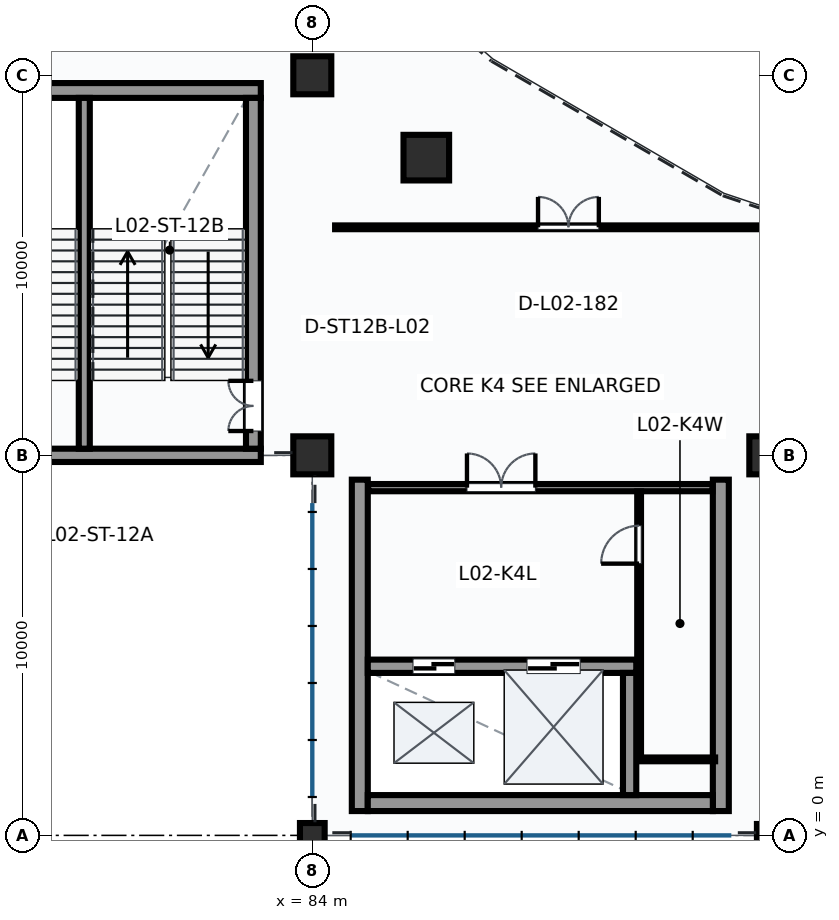
"""IFC4 building model, lengths in metres.
Left out: names, types, materials, properties, quantities, classifications, styles, units other than length and angle.
Written with IfcOpenShell. Run it as: python <this file> out.ifc"""

import sys

from ifc_helpers import new_model, si_unit, direction, frame, frame_2d, origin, origin_2d, place, context, subcontext, project, spatial, rectangle, extrude, element, fill, save


model = new_model("IFC4")
c1 = context("Model", 3, precision=1e-05, world=origin(), true_north=direction((0.0, 1.0)))
c2 = subcontext(c1, "Body", "Model", "MODEL_VIEW")
j1 = project(units=[si_unit("LENGTHUNIT", "METRE"), si_unit("PLANEANGLEUNIT", "RADIAN")], contexts=[c1])
p1 = place(None, origin())
s1 = spatial("IfcSite", under=j1, at=p1, CompositionType="ELEMENT")
p2 = place(p1, origin())
s2 = spatial("IfcBuilding", under=s1, at=p2, CompositionType="ELEMENT")
p3 = place(p2, frame((0.0, 0.0, 10.2)))
s3 = spatial("IfcBuildingStorey", under=s2, at=p3, CompositionType="ELEMENT", Elevation=10.2)
p4 = place(p3, frame((84.0, 0.0, 0.0), z_axis=(0.0, 0.0, 1.0), x_axis=(1.0, 0.0, 0.0)))
e1 = element("IfcColumn", 1, at=p4, inside=s3, PredefinedType="COLUMN", context=c2, shape_type="SweptSolid", body=[
    extrude(rectangle(XDim=0.65, YDim=0.65, at=origin_2d()), origin(), (0.0, 0.0, 1.0), 4.5),
])
for number, where, z_axis, x_axis in (
    (2, (84.0, 10.0, 0.0), (0.0, 0.0, 1.0), (1.0, 0.0, 0.0)),
    (3, (84.0, 20.0, 0.0), (0.0, 0.0, 1.0), (1.0, 0.0, 0.0)),
):
    element("IfcColumn", number, at=place(p3, frame(where, z_axis=z_axis, x_axis=x_axis)), inside=s3, PredefinedType="COLUMN", context=c2, shape_type="SweptSolid", body=[
        extrude(rectangle(XDim=1.0, YDim=1.0, at=origin_2d()), origin(), (0.0, 0.0, 1.0), 4.5),
    ])
p5 = place(p3, frame((96.0, 0.0, 0.0), z_axis=(0.0, 0.0, 1.0), x_axis=(1.0, 0.0, 0.0)))
e4 = element("IfcColumn", 4, at=p5, inside=s3, PredefinedType="COLUMN", context=c2, shape_type="SweptSolid", body=[
    extrude(rectangle(XDim=0.6, YDim=0.6, at=origin_2d()), origin(), (0.0, 0.0, 1.0), 4.5),
])
p6 = place(p3, frame((96.0, 10.0, 0.0), z_axis=(0.0, 0.0, 1.0), x_axis=(1.0, 0.0, 0.0)))
e5 = element("IfcColumn", 5, at=p6, inside=s3, PredefinedType="COLUMN", context=c2, shape_type="SweptSolid", body=[
    extrude(rectangle(XDim=1.0, YDim=1.0, at=origin_2d()), origin(), (0.0, 0.0, 1.0), 4.5),
])
p7 = place(p3, frame((87.0, 17.833, 0.0), z_axis=(0.0, 0.0, 1.0), x_axis=(1.0, 0.0, 0.0)))
e6 = element("IfcColumn", 6, at=p7, inside=s3, PredefinedType="COLUMN", context=c2, shape_type="SweptSolid", body=[
    extrude(rectangle(XDim=1.2, YDim=1.2, at=origin_2d()), origin(), (0.0, 0.0, 1.0), 4.5),
])
p8 = place(p3, frame((73.355, 10.0, 0.0), z_axis=(0.0, 0.0, 1.0), x_axis=(1.0, 0.0, 0.0)))
e7 = element("IfcWall", 7, at=p8, inside=s3, PredefinedType="SHEAR", context=c2, shape_type="SweptSolid", body=[
    extrude(rectangle(XDim=9.29, YDim=0.35, at=frame_2d((4.645, 0.0))), origin(), (0.0, 0.0, 1.0), 3.586),
])
p9 = place(p3, frame((73.355, 19.6, 0.0), z_axis=(0.0, 0.0, 1.0), x_axis=(1.0, 0.0, 0.0)))
e8 = element("IfcWall", 8, at=p9, inside=s3, PredefinedType="SHEAR", context=c2, shape_type="SweptSolid", body=[
    extrude(rectangle(XDim=9.29, YDim=0.39, at=frame_2d((4.645, 0.0))), origin(), (0.0, 0.0, 1.0), 4.5),
])
p10 = place(p3, frame((82.45, 10.175, 0.0), z_axis=(0.0, 0.0, 1.0), x_axis=(0.0, 1.0, 0.0)))
e9 = element("IfcWall", 9, at=p10, inside=s3, PredefinedType="SHEAR", context=c2, shape_type="SweptSolid", body=[
    extrude(rectangle(XDim=9.23, YDim=0.39, at=frame_2d((4.615, 0.0))), origin(), (0.0, 0.0, 1.0), 4.5),
])
p11 = place(p10, frame((0.465, 0.0, 0.0)))
e10 = element("IfcOpeningElement", 10, at=p11, cuts=e9, PredefinedType="OPENING", context=c2, shape_type="SweptSolid", body=[
    extrude(rectangle(XDim=1.32, YDim=2.2, at=frame_2d((0.66, 1.1))), frame((0.0, 0.205, 0.0), z_axis=(0.0, -1.0, 0.0), x_axis=(1.0, 0.0, 0.0)), (0.0, 0.0, 1.0), 0.41),
])
p12 = place(p3, frame((78.0, 10.175, 0.0), z_axis=(0.0, 0.0, 1.0), x_axis=(0.0, 1.0, 0.0)))
e11 = element("IfcWall", 11, at=p12, inside=s3, PredefinedType="SHEAR", context=c2, shape_type="SweptSolid", body=[
    extrude(rectangle(XDim=9.23, YDim=0.29, at=frame_2d((4.615, 0.0))), origin(), (0.0, 0.0, 1.0), 4.5),
])
for number, where, z_axis, x_axis in (
    (12, (85.25, 0.64, 0.0), (0.0, 0.0, 1.0), (0.0, 1.0, 0.0)),
    (13, (94.75, 0.64, 0.0), (0.0, 0.0, 1.0), (0.0, 1.0, 0.0)),
):
    element("IfcWall", number, at=place(p3, frame(where, z_axis=z_axis, x_axis=x_axis)), inside=s3, PredefinedType="SHEAR", context=c2, shape_type="SweptSolid", body=[
        extrude(rectangle(XDim=8.72, YDim=0.42, at=frame_2d((4.36, 0.0))), origin(), (0.0, 0.0, 1.0), 4.5),
    ])
p13 = place(p3, frame((85.46, 0.85, 0.0), z_axis=(0.0, 0.0, 1.0), x_axis=(1.0, 0.0, 0.0)))
e14 = element("IfcWall", 14, at=p13, inside=s3, PredefinedType="SHEAR", context=c2, shape_type="SweptSolid", body=[
    extrude(rectangle(XDim=9.08, YDim=0.42, at=frame_2d((4.54, 0.0))), origin(), (0.0, 0.0, 1.0), 4.5),
])
p14 = place(p3, frame((85.46, 4.45, 0.0), z_axis=(0.0, 0.0, 1.0), x_axis=(1.0, 0.0, 0.0)))
e15 = element("IfcWall", 15, at=p14, inside=s3, PredefinedType="SHEAR", context=c2, shape_type="SweptSolid", body=[
    extrude(rectangle(XDim=7.065, YDim=0.35, at=frame_2d((3.532, 0.0))), origin(), (0.0, 0.0, 1.0), 4.5),
])
p15 = place(p14, frame((1.19, 0.0, 0.0)))
e16 = element("IfcOpeningElement", 16, at=p15, cuts=e15, PredefinedType="OPENING", context=c2, shape_type="SweptSolid", body=[
    extrude(rectangle(XDim=1.1, YDim=2.2, at=frame_2d((0.55, 1.1))), frame((0.0, 0.185, 0.0), z_axis=(0.0, -1.0, 0.0), x_axis=(1.0, 0.0, 0.0)), (0.0, 0.0, 1.0), 0.37),
])
p16 = place(p14, frame((4.19, 0.0, 0.0)))
e17 = element("IfcOpeningElement", 17, at=p16, cuts=e15, PredefinedType="OPENING", context=c2, shape_type="SweptSolid", body=[
    extrude(rectangle(XDim=1.4, YDim=2.3, at=frame_2d((0.7, 1.15))), frame((0.0, 0.185, 0.0), z_axis=(0.0, -1.0, 0.0), x_axis=(1.0, 0.0, 0.0)), (0.0, 0.0, 1.0), 0.37),
])
p17 = place(p3, frame((92.35, 1.06, 0.0), z_axis=(0.0, 0.0, 1.0), x_axis=(0.0, 1.0, 0.0)))
e18 = element("IfcWall", 18, at=p17, inside=s3, PredefinedType="SHEAR", context=c2, shape_type="SweptSolid", body=[
    extrude(rectangle(XDim=3.215, YDim=0.35, at=frame_2d((1.607, 0.0))), origin(), (0.0, 0.0, 1.0), 4.5),
])
p18 = place(p3, frame((85.47, 9.15, 0.0), z_axis=(0.0, 0.0, 1.0), x_axis=(1.0, 0.0, 0.0)))
e19 = element("IfcWall", 19, at=p18, inside=s3, PredefinedType="PARTITIONING", context=c2, shape_type="SweptSolid", body=[
    extrude(rectangle(XDim=9.06, YDim=0.19, at=frame_2d((4.53, 0.0))), origin(), (0.0, 0.0, 1.0), 4.15),
])
p19 = place(p18, frame((2.6, 0.0, 0.0)))
e20 = element("IfcOpeningElement", 20, at=p19, cuts=e19, PredefinedType="OPENING", context=c2, shape_type="SweptSolid", body=[
    extrude(rectangle(XDim=1.8, YDim=2.3, at=frame_2d((0.9, 1.15))), frame((0.0, 0.105, 0.0), z_axis=(0.0, -1.0, 0.0), x_axis=(1.0, 0.0, 0.0)), (0.0, 0.0, 1.0), 0.21),
])
p20 = place(p3, frame((92.6, 2.0, 0.0), z_axis=(0.0, 0.0, 1.0), x_axis=(0.0, 1.0, 0.0)))
e21 = element("IfcWall", 21, at=p20, inside=s3, PredefinedType="PARTITIONING", context=c2, shape_type="SweptSolid", body=[
    extrude(rectangle(XDim=7.05, YDim=0.1, at=frame_2d((3.525, 0.0))), origin(), (0.0, 0.0, 1.0), 4.15),
])
p21 = place(p20, frame((5.15, 0.0, 0.0)))
e22 = element("IfcOpeningElement", 22, at=p21, cuts=e21, PredefinedType="OPENING", context=c2, shape_type="SweptSolid", body=[
    extrude(rectangle(XDim=1.0, YDim=2.1, at=frame_2d((0.5, 1.05))), frame((0.0, 0.06, 0.0), z_axis=(0.0, -1.0, 0.0), x_axis=(1.0, 0.0, 0.0)), (0.0, 0.0, 1.0), 0.12),
])
p22 = place(p3, frame((92.6, 2.0, 0.0), z_axis=(0.0, 0.0, 1.0), x_axis=(1.0, 0.0, 0.0)))
e23 = element("IfcWall", 23, at=p22, inside=s3, PredefinedType="PARTITIONING", context=c2, shape_type="SweptSolid", body=[
    extrude(rectangle(XDim=2.0, YDim=0.1, at=frame_2d((1.0, 0.0))), origin(), (0.0, 0.0, 1.0), 4.15),
])
p23 = place(p3, frame((84.6, 16.0, 0.0), z_axis=(0.0, 0.0, 1.0), x_axis=(1.0, 0.0, 0.0)))
e24 = element("IfcWall", 24, at=p23, inside=s3, PredefinedType="PARTITIONING", context=c2, shape_type="SweptSolid", body=[
    extrude(rectangle(XDim=12.28, YDim=0.1, at=frame_2d((6.14, 0.0))), origin(), (0.0, 0.0, 1.0), 4.15),
])
p24 = place(p23, frame((5.34, 0.0, 0.0)))
e25 = element("IfcOpeningElement", 25, at=p24, cuts=e24, PredefinedType="OPENING", context=c2, shape_type="SweptSolid", body=[
    extrude(rectangle(XDim=1.6, YDim=2.2, at=frame_2d((0.8, 1.1))), frame((0.0, 0.06, 0.0), z_axis=(0.0, -1.0, 0.0), x_axis=(1.0, 0.0, 0.0)), (0.0, 0.0, 1.0), 0.12),
])
p25 = place(p11, origin())
e26 = element("IfcDoor", 26, at=p25, inside=s3, OperationType="DOUBLE_DOOR_SINGLE_SWING", PredefinedType="DOOR", context=c2, shape_type="SweptSolid", body=[
    extrude(rectangle(XDim=1.32, YDim=2.2, at=frame_2d((0.66, 1.1))), frame((0.0, 0.025, 0.0), z_axis=(0.0, -1.0, 0.0), x_axis=(1.0, 0.0, 0.0)), (0.0, 0.0, 1.0), 0.05),
])
fill(e10, e26)
p26 = place(p15, origin())
e27 = element("IfcDoor", 27, at=p26, inside=s3, OperationType="SLIDING_TO_LEFT", PredefinedType="DOOR", context=c2, shape_type="SweptSolid", body=[
    extrude(rectangle(XDim=1.1, YDim=2.2, at=frame_2d((0.55, 1.1))), frame((0.0, 0.025, 0.0), z_axis=(0.0, -1.0, 0.0), x_axis=(1.0, 0.0, 0.0)), (0.0, 0.0, 1.0), 0.05),
])
fill(e16, e27)
p27 = place(p16, origin())
e28 = element("IfcDoor", 28, at=p27, inside=s3, OperationType="SLIDING_TO_LEFT", PredefinedType="DOOR", context=c2, shape_type="SweptSolid", body=[
    extrude(rectangle(XDim=1.4, YDim=2.3, at=frame_2d((0.7, 1.15))), frame((0.0, 0.025, 0.0), z_axis=(0.0, -1.0, 0.0), x_axis=(1.0, 0.0, 0.0)), (0.0, 0.0, 1.0), 0.05),
])
fill(e17, e28)
p28 = place(p19, origin())
e29 = element("IfcDoor", 29, at=p28, inside=s3, OperationType="DOUBLE_DOOR_SINGLE_SWING", PredefinedType="DOOR", context=c2, shape_type="SweptSolid", body=[
    extrude(rectangle(XDim=1.8, YDim=2.3, at=frame_2d((0.9, 1.15))), frame((0.0, 0.025, 0.0), z_axis=(0.0, -1.0, 0.0), x_axis=(1.0, 0.0, 0.0)), (0.0, 0.0, 1.0), 0.05),
])
fill(e20, e29)
p29 = place(p21, origin())
e30 = element("IfcDoor", 30, at=p29, inside=s3, OperationType="SINGLE_SWING_LEFT", PredefinedType="DOOR", context=c2, shape_type="SweptSolid", body=[
    extrude(rectangle(XDim=1.0, YDim=2.1, at=frame_2d((0.5, 1.05))), frame((0.0, 0.025, 0.0), z_axis=(0.0, -1.0, 0.0), x_axis=(1.0, 0.0, 0.0)), (0.0, 0.0, 1.0), 0.05),
])
fill(e22, e30)
p30 = place(p24, origin())
e31 = element("IfcDoor", 31, at=p30, inside=s3, OperationType="DOUBLE_DOOR_SINGLE_SWING", PredefinedType="DOOR", context=c2, shape_type="SweptSolid", body=[
    extrude(rectangle(XDim=1.6, YDim=2.2, at=frame_2d((0.8, 1.1))), frame((0.0, 0.025, 0.0), z_axis=(0.0, -1.0, 0.0), x_axis=(1.0, 0.0, 0.0)), (0.0, 0.0, 1.0), 0.05),
])
fill(e25, e31)
save(model, sys.argv[1])
